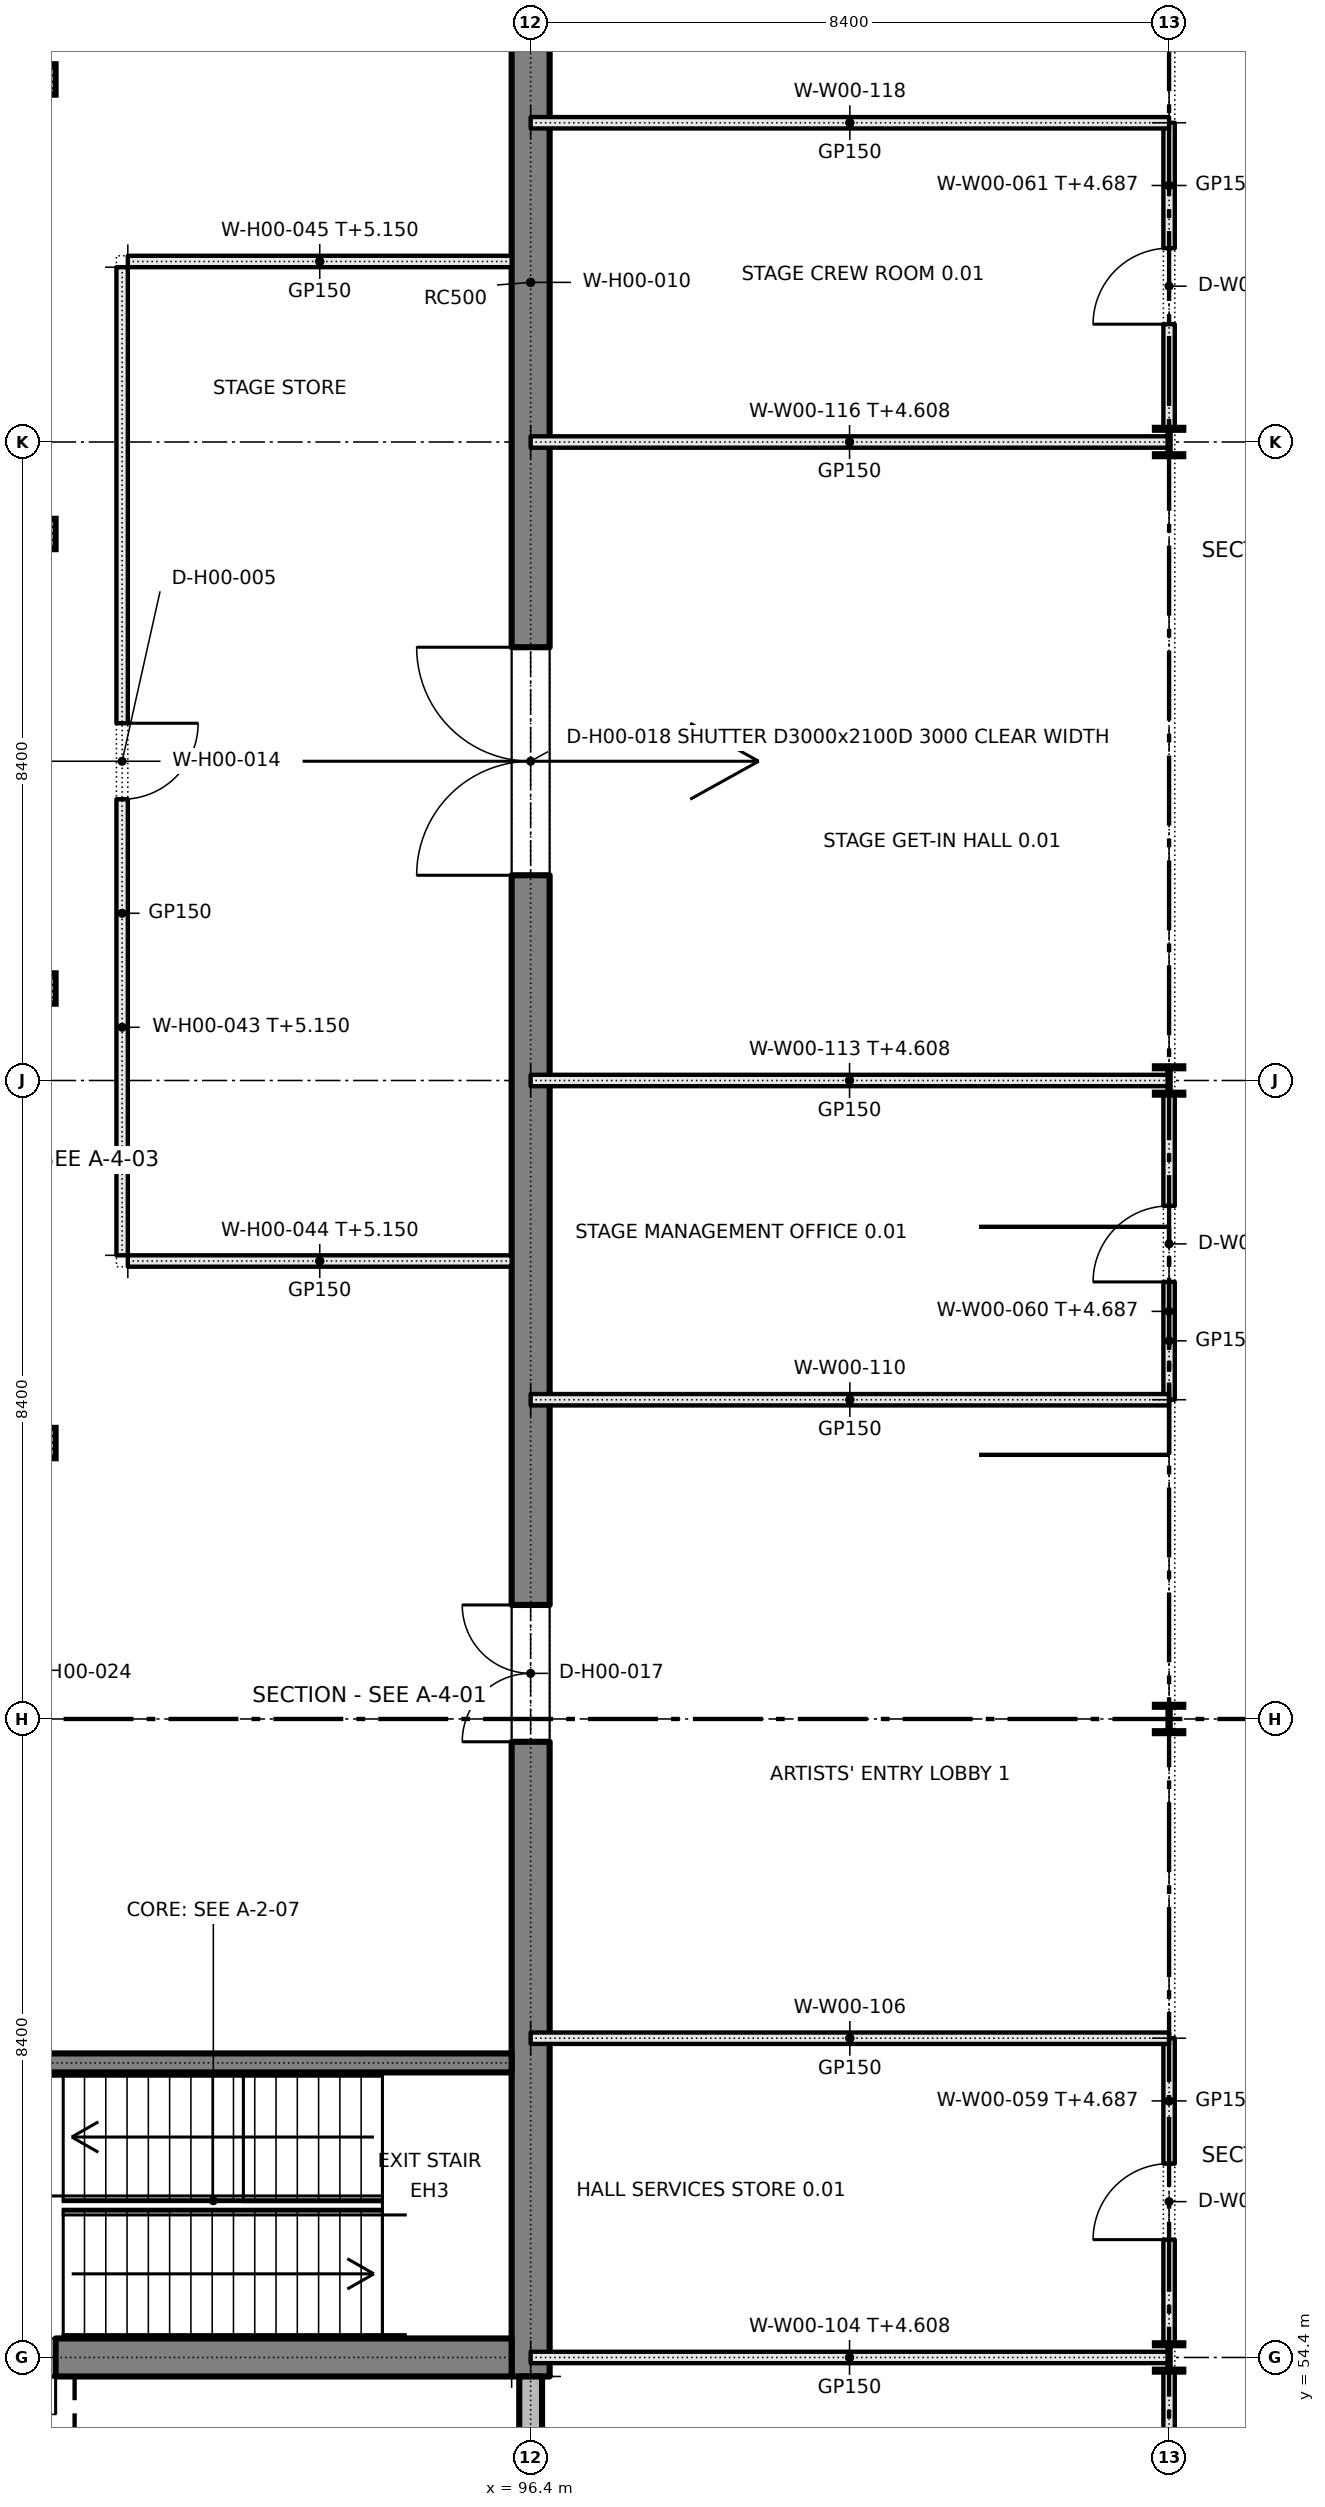
"""IFC4 building model, lengths in metres.
Left out: names, types, materials, properties, quantities, classifications, styles, units other than length and angle.
Written with IfcOpenShell. Run it as: python <this file> out.ifc"""

import sys

from ifc_helpers import new_model, si_unit, direction, frame, frame_2d, origin, origin_2d, place, context, subcontext, project, spatial, rectangle, i_section, extrude, element, fill, save


model = new_model("IFC4")
c1 = context("Model", 3, precision=1e-05, world=origin(), true_north=direction((0.0, 1.0)))
c2 = subcontext(c1, "Body", "Model", "MODEL_VIEW")
j1 = project(units=[si_unit("LENGTHUNIT", "METRE"), si_unit("PLANEANGLEUNIT", "RADIAN")], contexts=[c1])
p1 = place(None, origin())
s1 = spatial("IfcSite", under=j1, at=p1, CompositionType="ELEMENT")
p2 = place(p1, origin())
s2 = spatial("IfcBuilding", under=s1, at=p2, CompositionType="ELEMENT")
p3 = place(p2, origin())
s3 = spatial("IfcBuildingStorey", under=s2, at=p3, CompositionType="ELEMENT", Elevation=0.0)
p4 = place(p3, frame((96.4, 54.15, 0.0), z_axis=(0.0, 0.0, 1.0), x_axis=(0.0, 1.0, 0.0)))
e1 = element("IfcWall", 1, at=p4, inside=s3, PredefinedType="SOLIDWALL", context=c2, shape_type="SweptSolid", body=[
    extrude(rectangle(XDim=42.5, YDim=0.5, at=frame_2d((21.25, 0.0))), origin(), (0.0, 0.0, 1.0), 5.4),
])
p5 = place(p4, frame((8.35, 0.0, 0.0)))
e2 = element("IfcOpeningElement", 2, at=p5, cuts=e1, PredefinedType="OPENING", context=c2, shape_type="SweptSolid", body=[
    extrude(rectangle(XDim=1.8, YDim=2.1, at=frame_2d((0.9, 1.05))), frame((0.0, 0.26, 0.0), z_axis=(0.0, -1.0, 0.0), x_axis=(1.0, 0.0, 0.0)), (0.0, 0.0, 1.0), 0.52),
])
p6 = place(p4, frame((19.75, 0.0, 0.0)))
e3 = element("IfcOpeningElement", 3, at=p6, cuts=e1, PredefinedType="OPENING", context=c2, shape_type="SweptSolid", body=[
    extrude(rectangle(XDim=3.0, YDim=2.1, at=frame_2d((1.5, 1.05))), frame((0.0, 0.26, 0.0), z_axis=(0.0, -1.0, 0.0), x_axis=(1.0, 0.0, 0.0)), (0.0, 0.0, 1.0), 0.52),
])
p7 = place(p4, frame((32.35, 0.0, 0.0)))
e4 = element("IfcOpeningElement", 4, at=p7, cuts=e1, PredefinedType="OPENING", context=c2, shape_type="SweptSolid", body=[
    extrude(rectangle(XDim=1.8, YDim=2.1, at=frame_2d((0.9, 1.05))), frame((0.0, 0.26, 0.0), z_axis=(0.0, -1.0, 0.0), x_axis=(1.0, 0.0, 0.0)), (0.0, 0.0, 1.0), 0.52),
])
p8 = place(p3, frame((29.45, 54.4, 0.0), z_axis=(0.0, 0.0, 1.0), x_axis=(1.0, 0.0, 0.0)))
e5 = element("IfcWall", 5, at=p8, inside=s3, PredefinedType="SOLIDWALL", context=c2, shape_type="SweptSolid", body=[
    extrude(rectangle(XDim=66.7, YDim=0.5, at=frame_2d((33.35, 0.0))), origin(), (0.0, 0.0, 1.0), 5.4),
])
p9 = place(p8, frame((11.75, 0.0, 0.9)))
e6 = element("IfcOpeningElement", 6, at=p9, cuts=e5, PredefinedType="OPENING", context=c2, shape_type="SweptSolid", body=[
    extrude(rectangle(XDim=1.2, YDim=3.6, at=frame_2d((0.6, 1.8))), frame((0.0, 0.26, 0.0), z_axis=(0.0, -1.0, 0.0), x_axis=(1.0, 0.0, 0.0)), (0.0, 0.0, 1.0), 0.52),
])
p10 = place(p8, frame((20.15, 0.0, 0.9)))
e7 = element("IfcOpeningElement", 7, at=p10, cuts=e5, PredefinedType="OPENING", context=c2, shape_type="SweptSolid", body=[
    extrude(rectangle(XDim=1.2, YDim=3.6, at=frame_2d((0.6, 1.8))), frame((0.0, 0.26, 0.0), z_axis=(0.0, -1.0, 0.0), x_axis=(1.0, 0.0, 0.0)), (0.0, 0.0, 1.0), 0.52),
])
p11 = place(p8, frame((28.55, 0.0, 0.9)))
e8 = element("IfcOpeningElement", 8, at=p11, cuts=e5, PredefinedType="OPENING", context=c2, shape_type="SweptSolid", body=[
    extrude(rectangle(XDim=1.2, YDim=3.6, at=frame_2d((0.6, 1.8))), frame((0.0, 0.26, 0.0), z_axis=(0.0, -1.0, 0.0), x_axis=(1.0, 0.0, 0.0)), (0.0, 0.0, 1.0), 0.52),
])
p12 = place(p8, frame((36.95, 0.0, 0.9)))
e9 = element("IfcOpeningElement", 9, at=p12, cuts=e5, PredefinedType="OPENING", context=c2, shape_type="SweptSolid", body=[
    extrude(rectangle(XDim=1.2, YDim=3.6, at=frame_2d((0.6, 1.8))), frame((0.0, 0.26, 0.0), z_axis=(0.0, -1.0, 0.0), x_axis=(1.0, 0.0, 0.0)), (0.0, 0.0, 1.0), 0.52),
])
p13 = place(p8, frame((45.35, 0.0, 0.9)))
e10 = element("IfcOpeningElement", 10, at=p13, cuts=e5, PredefinedType="OPENING", context=c2, shape_type="SweptSolid", body=[
    extrude(rectangle(XDim=1.2, YDim=3.6, at=frame_2d((0.6, 1.8))), frame((0.0, 0.26, 0.0), z_axis=(0.0, -1.0, 0.0), x_axis=(1.0, 0.0, 0.0)), (0.0, 0.0, 1.0), 0.52),
])
p14 = place(p8, frame((53.75, 0.0, 0.9)))
e11 = element("IfcOpeningElement", 11, at=p14, cuts=e5, PredefinedType="OPENING", context=c2, shape_type="SweptSolid", body=[
    extrude(rectangle(XDim=1.2, YDim=3.6, at=frame_2d((0.6, 1.8))), frame((0.0, 0.26, 0.0), z_axis=(0.0, -1.0, 0.0), x_axis=(1.0, 0.0, 0.0)), (0.0, 0.0, 1.0), 0.52),
])
p15 = place(p8, frame((0.1, 0.0, 0.0)))
e12 = element("IfcOpeningElement", 12, at=p15, cuts=e5, PredefinedType="OPENING", context=c2, shape_type="SweptSolid", body=[
    extrude(rectangle(XDim=1.5, YDim=2.1, at=frame_2d((0.75, 1.05))), frame((0.0, 0.26, 0.0), z_axis=(0.0, -1.0, 0.0), x_axis=(1.0, 0.0, 0.0)), (0.0, 0.0, 1.0), 0.52),
])
p16 = place(p8, frame((59.2, 0.0, 0.0)))
e13 = element("IfcOpeningElement", 13, at=p16, cuts=e5, PredefinedType="OPENING", context=c2, shape_type="SweptSolid", body=[
    extrude(rectangle(XDim=1.5, YDim=2.1, at=frame_2d((0.75, 1.05))), frame((0.0, 0.26, 0.0), z_axis=(0.0, -1.0, 0.0), x_axis=(1.0, 0.0, 0.0)), (0.0, 0.0, 1.0), 0.52),
])
p17 = place(p3, frame((88.3, 58.275, 0.0), z_axis=(0.0, 0.0, 1.0), x_axis=(1.0, 0.0, 0.0)))
e14 = element("IfcWall", 14, at=p17, inside=s3, PredefinedType="SOLIDWALL", context=c2, shape_type="SweptSolid", body=[
    extrude(rectangle(XDim=7.85, YDim=0.25, at=frame_2d((3.925, 0.0))), origin(), (0.0, 0.0, 1.0), 5.4),
])
p18 = place(p17, frame((0.5, 0.0, 0.0)))
e15 = element("IfcOpeningElement", 15, at=p18, cuts=e14, PredefinedType="OPENING", context=c2, shape_type="SweptSolid", body=[
    extrude(rectangle(XDim=1.2, YDim=2.1, at=frame_2d((0.6, 1.05))), frame((0.0, 0.135, 0.0), z_axis=(0.0, -1.0, 0.0), x_axis=(1.0, 0.0, 0.0)), (0.0, 0.0, 1.0), 0.27),
])
for number, where, z_axis, x_axis in (
    (16, (89.95, 66.43, 0.0), (0.0, 0.0, 1.0), (1.0, 0.0, 0.0)),
    (17, (89.95, 72.41, 0.0), (0.0, 0.0, 1.0), (1.0, 0.0, 0.0)),
    (18, (89.95, 78.39, 0.0), (0.0, 0.0, 1.0), (1.0, 0.0, 0.0)),
    (19, (89.95, 84.37, 0.0), (0.0, 0.0, 1.0), (1.0, 0.0, 0.0)),
):
    element("IfcColumn", number, at=place(p3, frame(where, z_axis=z_axis, x_axis=x_axis)), inside=s3, PredefinedType="COLUMN", context=c2, shape_type="SweptSolid", body=[
        extrude(rectangle(XDim=0.4, YDim=0.4, at=origin_2d()), origin(), (0.0, 0.0, 1.0), 5.4),
    ])
for number, where, z_axis, x_axis in (
    (20, (104.8, 54.4, 0.0), (0.0, 0.0, 1.0), (1.0, 0.0, 0.0)),
    (21, (104.8, 62.8, 0.0), (0.0, 0.0, 1.0), (1.0, 0.0, 0.0)),
    (22, (104.8, 71.2, 0.0), (0.0, 0.0, 1.0), (1.0, 0.0, 0.0)),
    (23, (104.8, 79.6, 0.0), (0.0, 0.0, 1.0), (1.0, 0.0, 0.0)),
):
    element("IfcColumn", number, at=place(p3, frame(where, z_axis=z_axis, x_axis=x_axis)), inside=s3, PredefinedType="COLUMN", context=c2, shape_type="SweptSolid", body=[
        extrude(i_section(OverallWidth=0.373, OverallDepth=0.373, WebThickness=0.016, FlangeThickness=0.026, FilletRadius=0.015, at=origin_2d()), origin(), (0.0, 0.0, 1.0), 5.4),
    ])
p19 = place(p3, frame((96.4, 54.17, -0.3), z_axis=(0.0, 0.0, 1.0), x_axis=(0.0, 1.0, 0.0)))
e24 = element("IfcWall", 24, at=p19, inside=s3, PredefinedType="SOLIDWALL", context=c2, shape_type="SweptSolid", body=[
    extrude(rectangle(XDim=42.46, YDim=0.5, at=frame_2d((21.23, 0.0))), origin(), (0.0, 0.0, 1.0), 0.3),
])
p20 = place(p3, frame((29.45, 54.4, -0.5), z_axis=(0.0, 0.0, 1.0), x_axis=(1.0, 0.0, 0.0)))
e25 = element("IfcWall", 25, at=p20, inside=s3, PredefinedType="SOLIDWALL", context=c2, shape_type="SweptSolid", body=[
    extrude(rectangle(XDim=66.7, YDim=0.5, at=frame_2d((33.35, 0.0))), origin(), (0.0, 0.0, 1.0), 0.5),
])
p21 = place(p3, frame((88.32, 58.275, -0.5), z_axis=(0.0, 0.0, 1.0), x_axis=(1.0, 0.0, 0.0)))
e26 = element("IfcWall", 26, at=p21, inside=s3, PredefinedType="SOLIDWALL", context=c2, shape_type="SweptSolid", body=[
    extrude(rectangle(XDim=7.83, YDim=0.25, at=frame_2d((3.915, 0.0))), origin(), (0.0, 0.0, 1.0), 0.5),
])
p22 = place(p3, frame((96.4, 46.187, 0.0), z_axis=(0.0, 0.0, 1.0), x_axis=(0.0, 1.0, 0.0)))
e27 = element("IfcWall", 27, at=p22, inside=s3, PredefinedType="SOLIDWALL", context=c2, shape_type="SweptSolid", body=[
    extrude(rectangle(XDim=7.963, YDim=0.3, at=frame_2d((3.981, 0.0))), origin(), (0.0, 0.0, 1.0), 4.687),
])
p23 = place(p3, frame((91.025, 68.9, 0.0), z_axis=(0.0, 0.0, 1.0), x_axis=(0.0, 1.0, 0.0)))
e28 = element("IfcWall", 28, at=p23, inside=s3, PredefinedType="PARTITIONING", context=c2, shape_type="SweptSolid", body=[
    extrude(rectangle(XDim=13.0, YDim=0.15, at=frame_2d((6.5, 0.0))), origin(), (0.0, 0.0, 1.0), 5.15),
])
p24 = place(p23, frame((6.0, 0.0, 0.0)))
e29 = element("IfcOpeningElement", 29, at=p24, cuts=e28, PredefinedType="OPENING", context=c2, shape_type="SweptSolid", body=[
    extrude(rectangle(XDim=1.0, YDim=2.1, at=frame_2d((0.5, 1.05))), frame((0.0, 0.085, 0.0), z_axis=(0.0, -1.0, 0.0), x_axis=(1.0, 0.0, 0.0)), (0.0, 0.0, 1.0), 0.17),
])
for number, where, z_axis, x_axis in (
    (30, (91.1, 68.825, 0.0), (0.0, 0.0, 1.0), (1.0, 0.0, 0.0)),
    (31, (91.1, 81.975, 0.0), (0.0, 0.0, 1.0), (1.0, 0.0, 0.0)),
):
    element("IfcWall", number, at=place(p3, frame(where, z_axis=z_axis, x_axis=x_axis)), inside=s3, PredefinedType="PARTITIONING", context=c2, shape_type="SweptSolid", body=[
        extrude(rectangle(XDim=5.05, YDim=0.15, at=frame_2d((2.525, 0.0))), origin(), (0.0, 0.0, 1.0), 5.15),
    ])
p25 = place(p3, frame((104.8, 46.187, 0.0), z_axis=(0.0, 0.0, 1.0), x_axis=(0.0, 1.0, 0.0)))
e32 = element("IfcWall", 32, at=p25, inside=s3, PredefinedType="PARTITIONING", context=c2, shape_type="SweptSolid", body=[
    extrude(rectangle(XDim=8.027, YDim=0.15, at=frame_2d((4.013, 0.0))), origin(), (0.0, 0.0, 1.0), 4.687),
])
p26 = place(p25, frame((0.963, 0.0, 0.0)))
e33 = element("IfcOpeningElement", 33, at=p26, cuts=e32, PredefinedType="OPENING", context=c2, shape_type="SweptSolid", body=[
    extrude(rectangle(XDim=1.8, YDim=2.1, at=frame_2d((0.9, 1.05))), frame((0.0, 0.085, 0.0), z_axis=(0.0, -1.0, 0.0), x_axis=(1.0, 0.0, 0.0)), (0.0, 0.0, 1.0), 0.17),
])
p27 = place(p3, frame((104.8, 54.587, 0.0), z_axis=(0.0, 0.0, 1.0), x_axis=(0.0, 1.0, 0.0)))
e34 = element("IfcWall", 34, at=p27, inside=s3, PredefinedType="PARTITIONING", context=c2, shape_type="SweptSolid", body=[
    extrude(rectangle(XDim=4.013, YDim=0.15, at=frame_2d((2.007, 0.0))), origin(), (0.0, 0.0, 1.0), 4.687),
])
p28 = place(p27, frame((1.363, 0.0, 0.0)))
e35 = element("IfcOpeningElement", 35, at=p28, cuts=e34, PredefinedType="OPENING", context=c2, shape_type="SweptSolid", body=[
    extrude(rectangle(XDim=1.0, YDim=2.1, at=frame_2d((0.5, 1.05))), frame((0.0, 0.085, 0.0), z_axis=(0.0, -1.0, 0.0), x_axis=(1.0, 0.0, 0.0)), (0.0, 0.0, 1.0), 0.17),
])
p29 = place(p3, frame((104.8, 67.0, 0.0), z_axis=(0.0, 0.0, 1.0), x_axis=(0.0, 1.0, 0.0)))
e36 = element("IfcWall", 36, at=p29, inside=s3, PredefinedType="PARTITIONING", context=c2, shape_type="SweptSolid", body=[
    extrude(rectangle(XDim=4.013, YDim=0.15, at=frame_2d((2.007, 0.0))), origin(), (0.0, 0.0, 1.0), 4.687),
])
p30 = place(p29, frame((1.55, 0.0, 0.0)))
e37 = element("IfcOpeningElement", 37, at=p30, cuts=e36, PredefinedType="OPENING", context=c2, shape_type="SweptSolid", body=[
    extrude(rectangle(XDim=1.0, YDim=2.1, at=frame_2d((0.5, 1.05))), frame((0.0, 0.085, 0.0), z_axis=(0.0, -1.0, 0.0), x_axis=(1.0, 0.0, 0.0)), (0.0, 0.0, 1.0), 0.17),
])
p31 = place(p3, frame((104.8, 79.787, 0.0), z_axis=(0.0, 0.0, 1.0), x_axis=(0.0, 1.0, 0.0)))
e38 = element("IfcWall", 38, at=p31, inside=s3, PredefinedType="PARTITIONING", context=c2, shape_type="SweptSolid", body=[
    extrude(rectangle(XDim=4.013, YDim=0.15, at=frame_2d((2.007, 0.0))), origin(), (0.0, 0.0, 1.0), 4.687),
])
p32 = place(p31, frame((1.363, 0.0, 0.0)))
e39 = element("IfcOpeningElement", 39, at=p32, cuts=e38, PredefinedType="OPENING", context=c2, shape_type="SweptSolid", body=[
    extrude(rectangle(XDim=1.0, YDim=2.1, at=frame_2d((0.5, 1.05))), frame((0.0, 0.085, 0.0), z_axis=(0.0, -1.0, 0.0), x_axis=(1.0, 0.0, 0.0)), (0.0, 0.0, 1.0), 0.17),
])
p33 = place(p3, frame((96.4, 54.4, 0.0), z_axis=(0.0, 0.0, 1.0), x_axis=(1.0, 0.0, 0.0)))
e40 = element("IfcWall", 40, at=p33, inside=s3, PredefinedType="PARTITIONING", context=c2, shape_type="SweptSolid", body=[
    extrude(rectangle(XDim=8.392, YDim=0.15, at=frame_2d((4.196, 0.0))), origin(), (0.0, 0.0, 1.0), 4.608),
])
for number, where, z_axis, x_axis in (
    (41, (96.4, 58.6, 0.0), (0.0, 0.0, 1.0), (1.0, 0.0, 0.0)),
    (42, (96.4, 67.0, 0.0), (0.0, 0.0, 1.0), (1.0, 0.0, 0.0)),
):
    element("IfcWall", number, at=place(p3, frame(where, z_axis=z_axis, x_axis=x_axis)), inside=s3, PredefinedType="PARTITIONING", context=c2, shape_type="SweptSolid", body=[
        extrude(rectangle(XDim=8.4, YDim=0.15, at=frame_2d((4.2, 0.0))), origin(), (0.0, 0.0, 1.0), 5.4),
    ])
for number, where, z_axis, x_axis in (
    (43, (96.4, 71.2, 0.0), (0.0, 0.0, 1.0), (1.0, 0.0, 0.0)),
    (44, (96.4, 79.6, 0.0), (0.0, 0.0, 1.0), (1.0, 0.0, 0.0)),
):
    element("IfcWall", number, at=place(p3, frame(where, z_axis=z_axis, x_axis=x_axis)), inside=s3, PredefinedType="PARTITIONING", context=c2, shape_type="SweptSolid", body=[
        extrude(rectangle(XDim=8.392, YDim=0.15, at=frame_2d((4.196, 0.0))), origin(), (0.0, 0.0, 1.0), 4.608),
    ])
p34 = place(p3, frame((96.4, 83.8, 0.0), z_axis=(0.0, 0.0, 1.0), x_axis=(1.0, 0.0, 0.0)))
e45 = element("IfcWall", 45, at=p34, inside=s3, PredefinedType="PARTITIONING", context=c2, shape_type="SweptSolid", body=[
    extrude(rectangle(XDim=8.4, YDim=0.15, at=frame_2d((4.2, 0.0))), origin(), (0.0, 0.0, 1.0), 5.4),
])
p35 = place(p24, frame((1.0, 0.0, 0.0), z_axis=(0.0, 0.0, 1.0), x_axis=(-1.0, 0.0, 0.0)))
e46 = element("IfcDoor", 46, at=p35, inside=s3, OperationType="SINGLE_SWING_LEFT", PredefinedType="DOOR", context=c2, shape_type="SweptSolid", body=[
    extrude(rectangle(XDim=1.0, YDim=2.1, at=frame_2d((0.5, 1.05))), frame((0.0, 0.025, 0.0), z_axis=(0.0, -1.0, 0.0), x_axis=(1.0, 0.0, 0.0)), (0.0, 0.0, 1.0), 0.05),
])
fill(e29, e46)
p36 = place(p16, frame((1.5, 0.0, 0.0), z_axis=(0.0, 0.0, 1.0), x_axis=(-1.0, 0.0, 0.0)))
e47 = element("IfcDoor", 47, at=p36, inside=s3, OperationType="DOUBLE_DOOR_SINGLE_SWING", PredefinedType="DOOR", context=c2, shape_type="SweptSolid", body=[
    extrude(rectangle(XDim=1.5, YDim=2.1, at=frame_2d((0.75, 1.05))), frame((0.0, 0.025, 0.0), z_axis=(0.0, -1.0, 0.0), x_axis=(1.0, 0.0, 0.0)), (0.0, 0.0, 1.0), 0.05),
])
fill(e13, e47)
p37 = place(p5, origin())
e48 = element("IfcDoor", 48, at=p37, inside=s3, OperationType="DOUBLE_DOOR_SINGLE_SWING", PredefinedType="DOOR", context=c2, shape_type="SweptSolid", body=[
    extrude(rectangle(XDim=1.8, YDim=2.1, at=frame_2d((0.9, 1.05))), frame((0.0, 0.025, 0.0), z_axis=(0.0, -1.0, 0.0), x_axis=(1.0, 0.0, 0.0)), (0.0, 0.0, 1.0), 0.05),
])
fill(e2, e48)
p38 = place(p6, origin())
e49 = element("IfcDoor", 49, at=p38, inside=s3, OperationType="DOUBLE_DOOR_SINGLE_SWING", PredefinedType="DOOR", context=c2, shape_type="SweptSolid", body=[
    extrude(rectangle(XDim=3.0, YDim=2.1, at=frame_2d((1.5, 1.05))), frame((0.0, 0.025, 0.0), z_axis=(0.0, -1.0, 0.0), x_axis=(1.0, 0.0, 0.0)), (0.0, 0.0, 1.0), 0.05),
])
fill(e3, e49)
p39 = place(p28, origin())
e50 = element("IfcDoor", 50, at=p39, inside=s3, OperationType="SINGLE_SWING_LEFT", PredefinedType="DOOR", context=c2, shape_type="SweptSolid", body=[
    extrude(rectangle(XDim=1.0, YDim=2.1, at=frame_2d((0.5, 1.05))), frame((0.0, 0.025, 0.0), z_axis=(0.0, -1.0, 0.0), x_axis=(1.0, 0.0, 0.0)), (0.0, 0.0, 1.0), 0.05),
])
fill(e35, e50)
p40 = place(p30, origin())
e51 = element("IfcDoor", 51, at=p40, inside=s3, OperationType="SINGLE_SWING_LEFT", PredefinedType="DOOR", context=c2, shape_type="SweptSolid", body=[
    extrude(rectangle(XDim=1.0, YDim=2.1, at=frame_2d((0.5, 1.05))), frame((0.0, 0.025, 0.0), z_axis=(0.0, -1.0, 0.0), x_axis=(1.0, 0.0, 0.0)), (0.0, 0.0, 1.0), 0.05),
])
fill(e37, e51)
p41 = place(p32, origin())
e52 = element("IfcDoor", 52, at=p41, inside=s3, OperationType="SINGLE_SWING_LEFT", PredefinedType="DOOR", context=c2, shape_type="SweptSolid", body=[
    extrude(rectangle(XDim=1.0, YDim=2.1, at=frame_2d((0.5, 1.05))), frame((0.0, 0.025, 0.0), z_axis=(0.0, -1.0, 0.0), x_axis=(1.0, 0.0, 0.0)), (0.0, 0.0, 1.0), 0.05),
])
fill(e39, e52)
save(model, sys.argv[1])
